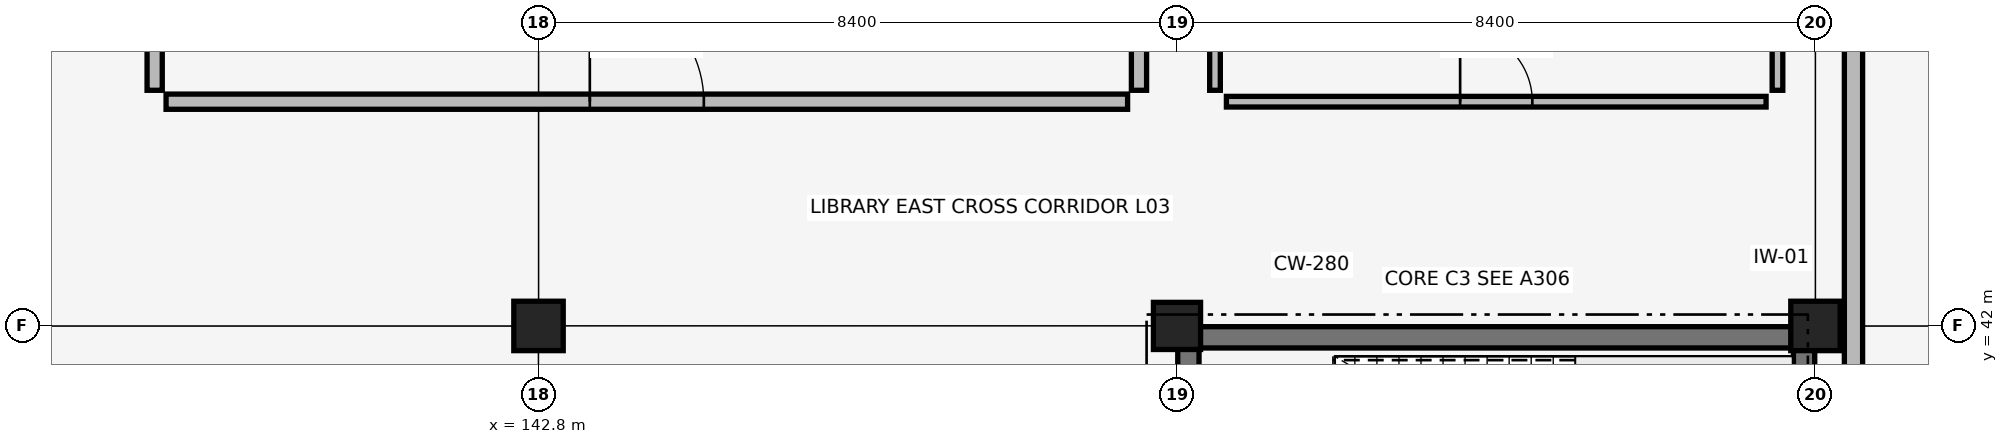
"""IFC4 building model, lengths in metres.
Left out: names, types, materials, properties, quantities, classifications, styles, units other than length and angle.
Written with IfcOpenShell. Run it as: python <this file> out.ifc"""

import sys

from ifc_helpers import new_model, si_unit, direction, frame, frame_2d, origin, origin_2d, place, context, subcontext, project, spatial, rectangle, extrude, element, fill, save


model = new_model("IFC4")
c1 = context("Model", 3, precision=1e-05, world=origin(), true_north=direction((0.0, 1.0)))
c2 = subcontext(c1, "Body", "Model", "MODEL_VIEW")
j1 = project(units=[si_unit("LENGTHUNIT", "METRE"), si_unit("PLANEANGLEUNIT", "RADIAN")], contexts=[c1])
p1 = place(None, origin())
s1 = spatial("IfcSite", under=j1, at=p1, CompositionType="ELEMENT")
p2 = place(p1, origin())
s2 = spatial("IfcBuilding", under=s1, at=p2, CompositionType="ELEMENT")
p3 = place(p2, frame((0.0, 0.0, 13.94)))
s3 = spatial("IfcBuildingStorey", under=s2, at=p3, CompositionType="ELEMENT", Elevation=13.94)
p4 = place(p3, frame((151.35, 41.85, 0.0), z_axis=(0.0, 0.0, 1.0), x_axis=(1.0, 0.0, 0.0)))
e1 = element("IfcWall", 1, at=p4, inside=s3, PredefinedType="SHEAR", context=c2, shape_type="SweptSolid", body=[
    extrude(rectangle(XDim=8.1, YDim=0.28, at=frame_2d((4.05, 0.0))), origin(), (0.0, 0.0, 1.0), 3.78),
])
p5 = place(p3, frame((151.35, 33.75, 0.0), z_axis=(0.0, 0.0, 1.0), x_axis=(0.0, 1.0, 0.0)))
e2 = element("IfcWall", 2, at=p5, inside=s3, PredefinedType="SHEAR", context=c2, shape_type="SweptSolid", body=[
    extrude(rectangle(XDim=8.1, YDim=0.28, at=frame_2d((4.05, 0.0))), origin(), (0.0, 0.0, 1.0), 3.78),
])
p6 = place(p5, frame((1.325, 0.0, 0.0)))
e3 = element("IfcOpeningElement", 3, at=p6, cuts=e2, PredefinedType="OPENING", context=c2, shape_type="SweptSolid", body=[
    extrude(rectangle(XDim=1.45, YDim=2.15, at=frame_2d((0.725, 1.075))), frame((0.0, 0.15, 0.0), z_axis=(0.0, -1.0, 0.0), x_axis=(1.0, 0.0, 0.0)), (0.0, 0.0, 1.0), 0.3),
])
p7 = place(p3, frame((159.45, 33.75, 0.0), z_axis=(0.0, 0.0, 1.0), x_axis=(0.0, 1.0, 0.0)))
e4 = element("IfcWall", 4, at=p7, inside=s3, PredefinedType="SHEAR", context=c2, shape_type="SweptSolid", body=[
    extrude(rectangle(XDim=8.1, YDim=0.28, at=frame_2d((4.05, 0.0))), origin(), (0.0, 0.0, 1.0), 3.78),
])
p8 = place(p3, frame((142.8, 42.0, 0.0), z_axis=(0.0, 0.0, 1.0), x_axis=(1.0, 0.0, 0.0)))
e5 = element("IfcColumn", 5, at=p8, inside=s3, PredefinedType="COLUMN", context=c2, shape_type="SweptSolid", body=[
    extrude(rectangle(XDim=0.65, YDim=0.65, at=origin_2d()), origin(), (0.0, 0.0, 1.0), 3.78),
])
p9 = place(p3, frame((151.2, 42.0, 0.0), z_axis=(0.0, 0.0, 1.0), x_axis=(1.0, 0.0, 0.0)))
e6 = element("IfcColumn", 6, at=p9, inside=s3, PredefinedType="COLUMN", context=c2, shape_type="SweptSolid", body=[
    extrude(rectangle(XDim=0.62, YDim=0.62, at=origin_2d()), origin(), (0.0, 0.0, 1.0), 3.78),
])
p10 = place(p3, frame((159.6, 42.0, 0.0), z_axis=(0.0, 0.0, 1.0), x_axis=(1.0, 0.0, 0.0)))
e7 = element("IfcColumn", 7, at=p10, inside=s3, PredefinedType="COLUMN", context=c2, shape_type="SweptSolid", body=[
    extrude(rectangle(XDim=0.65, YDim=0.65, at=origin_2d()), origin(), (0.0, 0.0, 1.0), 3.78),
])
p11 = place(p3, frame((160.1, 34.2, 0.0), z_axis=(0.0, 0.0, 1.0), x_axis=(0.0, 1.0, 0.0)))
e8 = element("IfcWall", 8, at=p11, inside=s3, PredefinedType="PARTITIONING", context=c2, shape_type="SweptSolid", body=[
    extrude(rectangle(XDim=40.8, YDim=0.24, at=frame_2d((20.4, 0.0))), origin(), (0.0, 0.0, 1.0), 3.05),
])
p12 = place(p11, frame((19.85, 0.0, 0.0)))
e9 = element("IfcOpeningElement", 9, at=p12, cuts=e8, PredefinedType="OPENING", context=c2, shape_type="SweptSolid", body=[
    extrude(rectangle(XDim=1.1, YDim=2.15, at=frame_2d((0.55, 1.075))), frame((0.0, 0.13, 0.0), z_axis=(0.0, -1.0, 0.0), x_axis=(1.0, 0.0, 0.0)), (0.0, 0.0, 1.0), 0.26),
])
p13 = place(p3, frame((137.9, 44.95, 0.0), z_axis=(0.0, 0.0, 1.0), x_axis=(1.0, 0.0, 0.0)))
e10 = element("IfcWall", 10, at=p13, inside=s3, PredefinedType="PARTITIONING", context=c2, shape_type="SweptSolid", body=[
    extrude(rectangle(XDim=12.65, YDim=0.2, at=frame_2d((6.325, 0.0))), origin(), (0.0, 0.0, 1.0), 3.35),
])
p14 = place(p13, frame((5.575, 0.0, 0.0)))
e11 = element("IfcOpeningElement", 11, at=p14, cuts=e10, PredefinedType="OPENING", context=c2, shape_type="SweptSolid", body=[
    extrude(rectangle(XDim=1.5, YDim=2.2, at=frame_2d((0.75, 1.1))), frame((0.0, 0.11, 0.0), z_axis=(0.0, -1.0, 0.0), x_axis=(1.0, 0.0, 0.0)), (0.0, 0.0, 1.0), 0.22),
])
for number, where, z_axis, x_axis in (
    (12, (137.75, 45.1, 0.0), (0.0, 0.0, 1.0), (0.0, 1.0, 0.0)),
    (13, (150.7, 45.1, 0.0), (0.0, 0.0, 1.0), (0.0, 1.0, 0.0)),
):
    element("IfcWall", number, at=place(p3, frame(where, z_axis=z_axis, x_axis=x_axis)), inside=s3, PredefinedType="PARTITIONING", context=c2, shape_type="SweptSolid", body=[
        extrude(rectangle(XDim=13.1, YDim=0.2, at=frame_2d((6.55, 0.0))), origin(), (0.0, 0.0, 1.0), 3.05),
    ])
p15 = place(p3, frame((151.85, 44.95, 0.0), z_axis=(0.0, 0.0, 1.0), x_axis=(1.0, 0.0, 0.0)))
e14 = element("IfcWall", 14, at=p15, inside=s3, PredefinedType="PARTITIONING", context=c2, shape_type="SweptSolid", body=[
    extrude(rectangle(XDim=7.1, YDim=0.14, at=frame_2d((3.55, 0.0))), origin(), (0.0, 0.0, 1.0), 3.78),
])
p16 = place(p15, frame((3.075, 0.0, 0.0)))
e15 = element("IfcOpeningElement", 15, at=p16, cuts=e14, PredefinedType="OPENING", context=c2, shape_type="SweptSolid", body=[
    extrude(rectangle(XDim=0.95, YDim=2.1, at=frame_2d((0.475, 1.05))), frame((0.0, 0.08, 0.0), z_axis=(0.0, -1.0, 0.0), x_axis=(1.0, 0.0, 0.0)), (0.0, 0.0, 1.0), 0.16),
])
for number, where, z_axis, x_axis in (
    (16, (151.7, 45.1, 0.0), (0.0, 0.0, 1.0), (0.0, 1.0, 0.0)),
    (17, (159.1, 45.1, 0.0), (0.0, 0.0, 1.0), (0.0, 1.0, 0.0)),
):
    element("IfcWall", number, at=place(p3, frame(where, z_axis=z_axis, x_axis=x_axis)), inside=s3, PredefinedType="PARTITIONING", context=c2, shape_type="SweptSolid", body=[
        extrude(rectangle(XDim=30.47, YDim=0.14, at=frame_2d((15.235, 0.0))), origin(), (0.0, 0.0, 1.0), 3.05),
    ])
p17 = place(p14, origin())
e18 = element("IfcDoor", 18, at=p17, inside=s3, OperationType="DOUBLE_DOOR_SINGLE_SWING", PredefinedType="DOOR", context=c2, shape_type="SweptSolid", body=[
    extrude(rectangle(XDim=1.5, YDim=2.2, at=frame_2d((0.75, 1.1))), frame((0.0, 0.025, 0.0), z_axis=(0.0, -1.0, 0.0), x_axis=(1.0, 0.0, 0.0)), (0.0, 0.0, 1.0), 0.05),
])
fill(e11, e18)
p18 = place(p16, origin())
e19 = element("IfcDoor", 19, at=p18, inside=s3, OperationType="SINGLE_SWING_LEFT", PredefinedType="DOOR", context=c2, shape_type="SweptSolid", body=[
    extrude(rectangle(XDim=0.95, YDim=2.1, at=frame_2d((0.475, 1.05))), frame((0.0, 0.025, 0.0), z_axis=(0.0, -1.0, 0.0), x_axis=(1.0, 0.0, 0.0)), (0.0, 0.0, 1.0), 0.05),
])
fill(e15, e19)
save(model, sys.argv[1])
